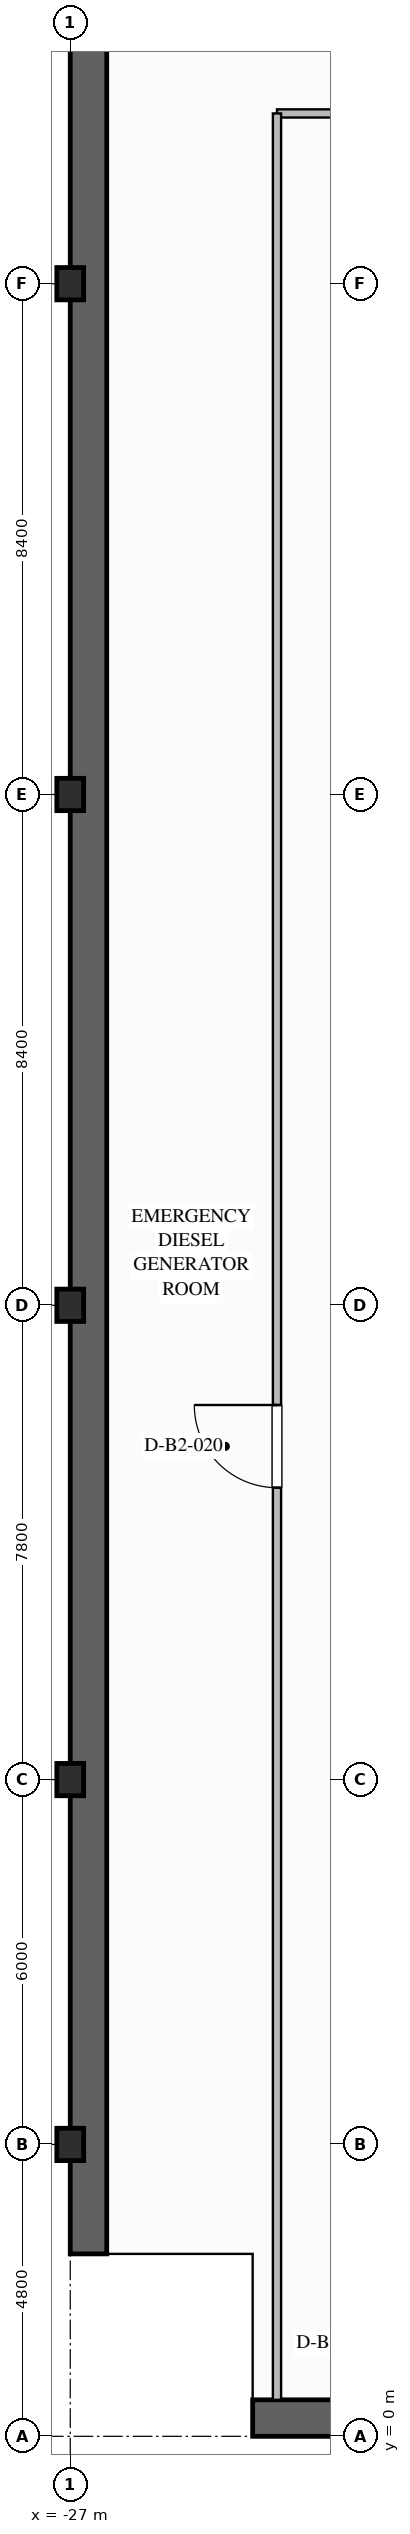
"""IFC4 building model, lengths in metres.
Left out: names, types, materials, properties, quantities, classifications, styles, units other than length and angle.
Written with IfcOpenShell. Run it as: python <this file> out.ifc"""

import sys

from ifc_helpers import new_model, si_unit, direction, frame, frame_2d, origin, origin_2d, place, context, subcontext, project, spatial, rectangle, i_section, extrude, element, fill, save


model = new_model("IFC4")
c1 = context("Model", 3, precision=1e-05, world=origin(), true_north=direction((0.0, 1.0)))
c2 = subcontext(c1, "Body", "Model", "MODEL_VIEW")
j1 = project(units=[si_unit("LENGTHUNIT", "METRE"), si_unit("PLANEANGLEUNIT", "RADIAN")], contexts=[c1])
p1 = place(None, origin())
s1 = spatial("IfcSite", under=j1, at=p1, CompositionType="ELEMENT")
p2 = place(p1, origin())
s2 = spatial("IfcBuilding", under=s1, at=p2, CompositionType="ELEMENT")
p3 = place(p2, frame((0.0, 0.0, -10.8)))
s3 = spatial("IfcBuildingStorey", under=s2, at=p3, CompositionType="ELEMENT", Elevation=-10.8)
p4 = place(p3, frame((36.0, 0.3, 0.0), z_axis=(0.0, 0.0, 1.0), x_axis=(-1.0, 0.0, 0.0)))
e1 = element("IfcWall", 1, at=p4, inside=s3, PredefinedType="USERDEFINED", context=c2, shape_type="SweptSolid", body=[
    extrude(rectangle(XDim=60.0, YDim=0.6, at=frame_2d((30.0, 0.0))), origin(), (0.0, 0.0, 1.0), 5.05),
])
p5 = place(p3, frame((-26.7, 3.0, 0.0), z_axis=(0.0, 0.0, 1.0), x_axis=(0.0, 1.0, 0.0)))
e2 = element("IfcWall", 2, at=p5, inside=s3, PredefinedType="USERDEFINED", context=c2, shape_type="SweptSolid", body=[
    extrude(rectangle(XDim=48.0, YDim=0.6, at=frame_2d((24.0, 0.0))), origin(), (0.0, 0.0, 1.0), 5.05),
])
for number, where, z_axis, x_axis in (
    (3, (-27.0, 4.8, 0.0), (0.0, 0.0, 1.0), (1.0, 0.0, 0.0)),
    (4, (-27.0, 10.8, 0.0), (0.0, 0.0, 1.0), (1.0, 0.0, 0.0)),
    (5, (-27.0, 18.6, 0.0), (0.0, 0.0, 1.0), (1.0, 0.0, 0.0)),
    (6, (-27.0, 27.0, 0.0), (0.0, 0.0, 1.0), (1.0, 0.0, 0.0)),
    (7, (-27.0, 35.4, 0.0), (0.0, 0.0, 1.0), (1.0, 0.0, 0.0)),
):
    element("IfcColumn", number, at=place(p3, frame(where, z_axis=z_axis, x_axis=x_axis)), inside=s3, PredefinedType="COLUMN", context=c2, shape_type="SweptSolid", body=[
        extrude(i_section(OverallWidth=0.442, OverallDepth=0.531, WebThickness=0.066, FlangeThickness=0.106, FilletRadius=0.03, at=origin_2d()), origin(), (0.0, 0.0, 1.0), 5.4),
    ])
p6 = place(p2, frame((0.0, 0.0, -5.4)))
s4 = spatial("IfcBuildingStorey", under=s2, at=p6, CompositionType="ELEMENT", Elevation=-5.4)
for number, where, z_axis, x_axis in (
    (8, (-32.325, 3.45, -5.4), (0.0, 0.0, 1.0), (1.0, 0.0, 0.0)),
    (9, (-32.325, 18.0, -5.4), (0.0, 0.0, 1.0), (1.0, 0.0, 0.0)),
):
    element("IfcWall", number, at=place(p6, frame(where, z_axis=z_axis, x_axis=x_axis)), inside=s4, PredefinedType="USERDEFINED", context=c2, shape_type="SweptSolid", body=[
        extrude(rectangle(XDim=5.325, YDim=0.45, at=frame_2d((2.663, 0.0))), origin(), (0.0, 0.0, 1.0), 10.62),
    ])
p7 = place(p6, frame((-23.55, -2.325, -5.4), z_axis=(0.0, 0.0, 1.0), x_axis=(0.0, 1.0, 0.0)))
e10 = element("IfcWall", 10, at=p7, inside=s4, PredefinedType="USERDEFINED", context=c2, shape_type="SweptSolid", body=[
    extrude(rectangle(XDim=2.325, YDim=0.45, at=frame_2d((1.163, 0.0))), origin(), (0.0, 0.0, 1.0), 10.62),
])
p8 = place(p3, frame((-23.6, 38.2, 0.0), z_axis=(0.0, 0.0, 1.0), x_axis=(1.0, 0.0, 0.0)))
e11 = element("IfcWall", 11, at=p8, inside=s3, PredefinedType="PARTITIONING", context=c2, shape_type="SweptSolid", body=[
    extrude(rectangle(XDim=47.3, YDim=0.135, at=frame_2d((23.65, 0.0))), origin(), (0.0, 0.0, 1.0), 5.05),
])
p9 = place(p8, frame((12.0, 0.0, 0.0)))
e12 = element("IfcOpeningElement", 12, at=p9, cuts=e11, PredefinedType="OPENING", context=c2, shape_type="SweptSolid", body=[
    extrude(rectangle(XDim=1.36, YDim=2.2, at=frame_2d((0.68, 1.1))), frame((0.0, 0.077, 0.0), z_axis=(0.0, -1.0, 0.0), x_axis=(1.0, 0.0, 0.0)), (0.0, 0.0, 1.0), 0.155),
])
p10 = place(p8, frame((32.0, 0.0, 0.0)))
e13 = element("IfcOpeningElement", 13, at=p10, cuts=e11, PredefinedType="OPENING", context=c2, shape_type="SweptSolid", body=[
    extrude(rectangle(XDim=1.36, YDim=2.2, at=frame_2d((0.68, 1.1))), frame((0.0, 0.077, 0.0), z_axis=(0.0, -1.0, 0.0), x_axis=(1.0, 0.0, 0.0)), (0.0, 0.0, 1.0), 0.155),
])
p11 = place(p3, frame((-23.6, 0.6, 0.0), z_axis=(0.0, 0.0, 1.0), x_axis=(0.0, 1.0, 0.0)))
e14 = element("IfcWall", 14, at=p11, inside=s3, PredefinedType="PARTITIONING", context=c2, shape_type="SweptSolid", body=[
    extrude(rectangle(XDim=37.6, YDim=0.135, at=frame_2d((18.8, 0.0))), origin(), (0.0, 0.0, 1.0), 5.05),
])
p12 = place(p11, frame((15.0, 0.0, 0.0)))
e15 = element("IfcOpeningElement", 15, at=p12, cuts=e14, PredefinedType="OPENING", context=c2, shape_type="SweptSolid", body=[
    extrude(rectangle(XDim=1.36, YDim=2.2, at=frame_2d((0.68, 1.1))), frame((0.0, 0.077, 0.0), z_axis=(0.0, -1.0, 0.0), x_axis=(1.0, 0.0, 0.0)), (0.0, 0.0, 1.0), 0.155),
])
p13 = place(p12, origin())
e16 = element("IfcDoor", 16, at=p13, inside=s3, OperationType="SINGLE_SWING_RIGHT", PredefinedType="DOOR", context=c2, shape_type="SweptSolid", body=[
    extrude(rectangle(XDim=1.36, YDim=2.2, at=frame_2d((0.68, 1.1))), frame((0.0, 0.025, 0.0), z_axis=(0.0, -1.0, 0.0), x_axis=(1.0, 0.0, 0.0)), (0.0, 0.0, 1.0), 0.05),
])
fill(e15, e16)
save(model, sys.argv[1])
